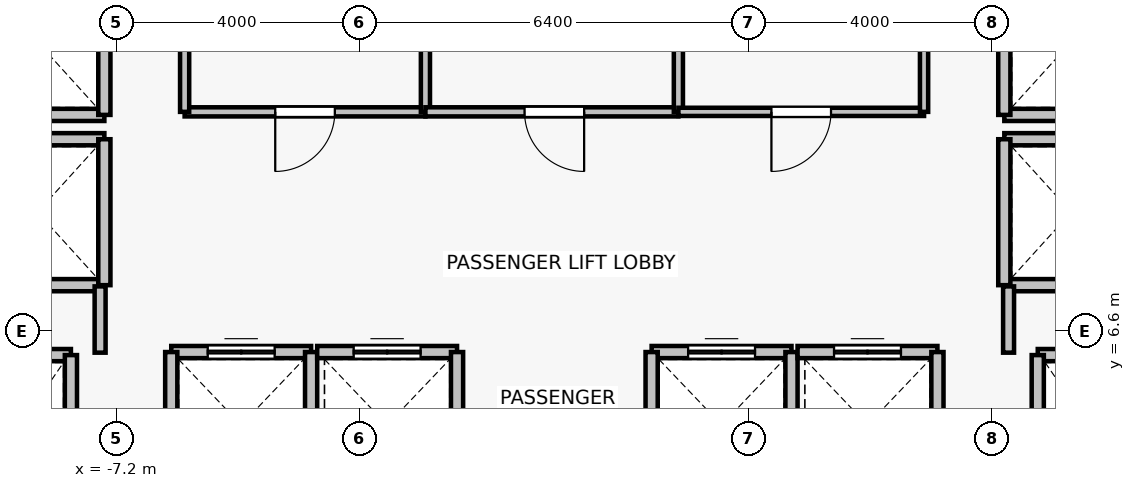
"""IFC4 building model, lengths in metres.
Left out: names, types, materials, properties, quantities, classifications, styles, units other than length and angle.
Written with IfcOpenShell. Run it as: python <this file> out.ifc"""

import sys

from ifc_helpers import new_model, si_unit, direction, frame, frame_2d, origin, place, context, subcontext, project, spatial, rectangle, extrude, source, transform, mapped, element, fill, save


model = new_model("IFC4")
c1 = context("Model", 3, precision=1e-05, world=origin(), true_north=direction((0.0, 1.0)))
c2 = subcontext(c1, "Body", "Model", "MODEL_VIEW")
j1 = project(units=[si_unit("LENGTHUNIT", "METRE"), si_unit("PLANEANGLEUNIT", "RADIAN")], contexts=[c1])
p1 = place(None, origin())
s1 = spatial("IfcSite", under=j1, at=p1, CompositionType="ELEMENT")
p2 = place(p1, origin())
s2 = spatial("IfcBuilding", under=s1, at=p2, CompositionType="ELEMENT")
p3 = place(p2, frame((0.0, 0.0, 179.2)))
s3 = spatial("IfcBuildingStorey", under=s2, at=p3, CompositionType="ELEMENT", Elevation=179.2)
p4 = place(p3, frame((-9.95, 6.2, 0.0), z_axis=(0.0, 0.0, 1.0), x_axis=(1.0, 0.0, 0.0)))
e1 = element("IfcWall", 1, at=p4, inside=s3, PredefinedType="SOLIDWALL", context=c2, shape_type="SweptSolid", body=[
    extrude(rectangle(XDim=2.0, YDim=0.2, at=frame_2d((1.0, 0.0))), origin(), (0.0, 0.0, 1.0), 3.075),
])
p5 = place(p3, frame((-7.95, 6.2, 0.0), z_axis=(0.0, 0.0, 1.0), x_axis=(0.0, -1.0, 0.0)))
e2 = element("IfcWall", 2, at=p5, inside=s3, PredefinedType="SOLIDWALL", context=c2, shape_type="SweptSolid", body=[
    extrude(rectangle(XDim=2.8, YDim=0.2, at=frame_2d((1.4, 0.0))), origin(), (0.0, 0.0, 1.0), 3.075),
])
p6 = place(p3, frame((7.95, 6.2, 0.0), z_axis=(0.0, 0.0, 1.0), x_axis=(1.0, 0.0, 0.0)))
e3 = element("IfcWall", 3, at=p6, inside=s3, PredefinedType="SOLIDWALL", context=c2, shape_type="SweptSolid", body=[
    extrude(rectangle(XDim=2.0, YDim=0.2, at=frame_2d((1.0, 0.0))), origin(), (0.0, 0.0, 1.0), 3.075),
])
p7 = place(p3, frame((7.95, 3.4, 0.0), z_axis=(0.0, 0.0, 1.0), x_axis=(0.0, 1.0, 0.0)))
e4 = element("IfcWall", 4, at=p7, inside=s3, PredefinedType="SOLIDWALL", context=c2, shape_type="SweptSolid", body=[
    extrude(rectangle(XDim=2.8, YDim=0.2, at=frame_2d((1.4, 0.0))), origin(), (0.0, 0.0, 1.0), 3.075),
])
p8 = place(p3, frame((-6.3, 6.25, 0.0), z_axis=(0.0, 0.0, 1.0), x_axis=(1.0, 0.0, 0.0)))
e5 = element("IfcWall", 5, at=p8, inside=s3, PredefinedType="SOLIDWALL", context=c2, shape_type="SweptSolid", body=[
    extrude(rectangle(XDim=2.3, YDim=0.2, at=frame_2d((1.15, 0.0))), origin(), (0.0, 0.0, 1.0), 3.075),
])
p9 = place(p8, frame((0.6, 0.0, 0.0)))
e6 = element("IfcOpeningElement", 6, at=p9, cuts=e5, PredefinedType="OPENING", context=c2, shape_type="SweptSolid", body=[
    extrude(rectangle(XDim=1.1, YDim=2.2, at=frame_2d((0.55, 1.1))), frame((0.0, 0.11, 0.0), z_axis=(0.0, -1.0, 0.0), x_axis=(1.0, 0.0, 0.0)), (0.0, 0.0, 1.0), 0.22),
])
for number, where, z_axis, x_axis in (
    (7, (-6.3, 3.85, 0.0), (0.0, 0.0, 1.0), (0.0, 1.0, 0.0)),
    (8, (-4.0, 6.25, 0.0), (0.0, 0.0, 1.0), (0.0, -1.0, 0.0)),
):
    element("IfcWall", number, at=place(p3, frame(where, z_axis=z_axis, x_axis=x_axis)), inside=s3, PredefinedType="SOLIDWALL", context=c2, shape_type="SweptSolid", body=[
        extrude(rectangle(XDim=2.4, YDim=0.2, at=frame_2d((1.2, 0.0))), origin(), (0.0, 0.0, 1.0), 3.075),
    ])
p10 = place(p3, frame((-3.9, 6.25, 0.0), z_axis=(0.0, 0.0, 1.0), x_axis=(1.0, 0.0, 0.0)))
e9 = element("IfcWall", 9, at=p10, inside=s3, PredefinedType="SOLIDWALL", context=c2, shape_type="SweptSolid", body=[
    extrude(rectangle(XDim=2.3, YDim=0.2, at=frame_2d((1.15, 0.0))), origin(), (0.0, 0.0, 1.0), 3.075),
])
p11 = place(p10, frame((0.6, 0.0, 0.0)))
e10 = element("IfcOpeningElement", 10, at=p11, cuts=e9, PredefinedType="OPENING", context=c2, shape_type="SweptSolid", body=[
    extrude(rectangle(XDim=1.1, YDim=2.2, at=frame_2d((0.55, 1.1))), frame((0.0, 0.11, 0.0), z_axis=(0.0, -1.0, 0.0), x_axis=(1.0, 0.0, 0.0)), (0.0, 0.0, 1.0), 0.22),
])
p12 = place(p3, frame((-1.6, 6.25, 0.0), z_axis=(0.0, 0.0, 1.0), x_axis=(0.0, -1.0, 0.0)))
e11 = element("IfcWall", 11, at=p12, inside=s3, PredefinedType="SOLIDWALL", context=c2, shape_type="SweptSolid", body=[
    extrude(rectangle(XDim=2.4, YDim=0.2, at=frame_2d((1.2, 0.0))), origin(), (0.0, 0.0, 1.0), 3.075),
])
p13 = place(p3, frame((1.6, 6.25, 0.0), z_axis=(0.0, 0.0, 1.0), x_axis=(1.0, 0.0, 0.0)))
e12 = element("IfcWall", 12, at=p13, inside=s3, PredefinedType="SOLIDWALL", context=c2, shape_type="SweptSolid", body=[
    extrude(rectangle(XDim=2.3, YDim=0.2, at=frame_2d((1.15, 0.0))), origin(), (0.0, 0.0, 1.0), 3.075),
])
p14 = place(p13, frame((0.6, 0.0, 0.0)))
e13 = element("IfcOpeningElement", 13, at=p14, cuts=e12, PredefinedType="OPENING", context=c2, shape_type="SweptSolid", body=[
    extrude(rectangle(XDim=1.1, YDim=2.2, at=frame_2d((0.55, 1.1))), frame((0.0, 0.11, 0.0), z_axis=(0.0, -1.0, 0.0), x_axis=(1.0, 0.0, 0.0)), (0.0, 0.0, 1.0), 0.22),
])
for number, where, z_axis, x_axis in (
    (14, (1.6, 3.85, 0.0), (0.0, 0.0, 1.0), (0.0, 1.0, 0.0)),
    (15, (3.9, 6.25, 0.0), (0.0, 0.0, 1.0), (0.0, -1.0, 0.0)),
):
    element("IfcWall", number, at=place(p3, frame(where, z_axis=z_axis, x_axis=x_axis)), inside=s3, PredefinedType="SOLIDWALL", context=c2, shape_type="SweptSolid", body=[
        extrude(rectangle(XDim=2.4, YDim=0.2, at=frame_2d((1.2, 0.0))), origin(), (0.0, 0.0, 1.0), 3.075),
    ])
p15 = place(p3, frame((4.0, 6.25, 0.0), z_axis=(0.0, 0.0, 1.0), x_axis=(1.0, 0.0, 0.0)))
e16 = element("IfcWall", 16, at=p15, inside=s3, PredefinedType="SOLIDWALL", context=c2, shape_type="SweptSolid", body=[
    extrude(rectangle(XDim=2.3, YDim=0.2, at=frame_2d((1.15, 0.0))), origin(), (0.0, 0.0, 1.0), 3.075),
])
p16 = place(p15, frame((0.6, 0.0, 0.0)))
e17 = element("IfcOpeningElement", 17, at=p16, cuts=e16, PredefinedType="OPENING", context=c2, shape_type="SweptSolid", body=[
    extrude(rectangle(XDim=1.1, YDim=2.2, at=frame_2d((0.55, 1.1))), frame((0.0, 0.11, 0.0), z_axis=(0.0, -1.0, 0.0), x_axis=(1.0, 0.0, 0.0)), (0.0, 0.0, 1.0), 0.22),
])
p17 = place(p3, frame((6.3, 6.25, 0.0), z_axis=(0.0, 0.0, 1.0), x_axis=(0.0, -1.0, 0.0)))
e18 = element("IfcWall", 18, at=p17, inside=s3, PredefinedType="SOLIDWALL", context=c2, shape_type="SweptSolid", body=[
    extrude(rectangle(XDim=2.4, YDim=0.2, at=frame_2d((1.2, 0.0))), origin(), (0.0, 0.0, 1.0), 3.075),
])
for number, where, z_axis, x_axis in (
    (19, (-7.4, 7.35, 0.0), (0.0, 0.0, 1.0), (-1.0, 0.0, 0.0)),
    (20, (-9.6, 9.75, 0.0), (0.0, 0.0, 1.0), (1.0, 0.0, 0.0)),
):
    element("IfcWall", number, at=place(p3, frame(where, z_axis=z_axis, x_axis=x_axis)), inside=s3, PredefinedType="SOLIDWALL", context=c2, shape_type="SweptSolid", body=[
        extrude(rectangle(XDim=2.2, YDim=0.2, at=frame_2d((1.1, 0.0))), origin(), (0.0, 0.0, 1.0), 2.565),
    ])
p18 = place(p3, frame((-7.4, 9.75, 0.0), z_axis=(0.0, 0.0, 1.0), x_axis=(0.0, -1.0, 0.0)))
e21 = element("IfcWall", 21, at=p18, inside=s3, PredefinedType="SOLIDWALL", context=c2, shape_type="SweptSolid", body=[
    extrude(rectangle(XDim=2.4, YDim=0.2, at=frame_2d((1.2, 0.0))), origin(), (0.0, 0.0, 1.0), 2.565),
])
p19 = place(p3, frame((-7.4, 10.15, 0.0), z_axis=(0.0, 0.0, 1.0), x_axis=(-1.0, 0.0, 0.0)))
e22 = element("IfcWall", 22, at=p19, inside=s3, PredefinedType="SOLIDWALL", context=c2, shape_type="SweptSolid", body=[
    extrude(rectangle(XDim=2.2, YDim=0.2, at=frame_2d((1.1, 0.0))), origin(), (0.0, 0.0, 1.0), 2.565),
])
p20 = place(p3, frame((-7.4, 12.55, 0.0), z_axis=(0.0, 0.0, 1.0), x_axis=(0.0, -1.0, 0.0)))
e23 = element("IfcWall", 23, at=p20, inside=s3, PredefinedType="SOLIDWALL", context=c2, shape_type="SweptSolid", body=[
    extrude(rectangle(XDim=2.4, YDim=0.2, at=frame_2d((1.2, 0.0))), origin(), (0.0, 0.0, 1.0), 2.565),
])
for number, where, z_axis, x_axis in (
    (24, (9.6, 7.35, 0.0), (0.0, 0.0, 1.0), (-1.0, 0.0, 0.0)),
    (25, (7.4, 9.75, 0.0), (0.0, 0.0, 1.0), (1.0, 0.0, 0.0)),
):
    element("IfcWall", number, at=place(p3, frame(where, z_axis=z_axis, x_axis=x_axis)), inside=s3, PredefinedType="SOLIDWALL", context=c2, shape_type="SweptSolid", body=[
        extrude(rectangle(XDim=2.2, YDim=0.2, at=frame_2d((1.1, 0.0))), origin(), (0.0, 0.0, 1.0), 2.565),
    ])
p21 = place(p3, frame((7.4, 7.35, 0.0), z_axis=(0.0, 0.0, 1.0), x_axis=(0.0, 1.0, 0.0)))
e26 = element("IfcWall", 26, at=p21, inside=s3, PredefinedType="SOLIDWALL", context=c2, shape_type="SweptSolid", body=[
    extrude(rectangle(XDim=2.4, YDim=0.2, at=frame_2d((1.2, 0.0))), origin(), (0.0, 0.0, 1.0), 2.565),
])
p22 = place(p3, frame((9.6, 10.15, 0.0), z_axis=(0.0, 0.0, 1.0), x_axis=(-1.0, 0.0, 0.0)))
e27 = element("IfcWall", 27, at=p22, inside=s3, PredefinedType="SOLIDWALL", context=c2, shape_type="SweptSolid", body=[
    extrude(rectangle(XDim=2.2, YDim=0.2, at=frame_2d((1.1, 0.0))), origin(), (0.0, 0.0, 1.0), 2.565),
])
p23 = place(p3, frame((7.4, 10.15, 0.0), z_axis=(0.0, 0.0, 1.0), x_axis=(0.0, 1.0, 0.0)))
e28 = element("IfcWall", 28, at=p23, inside=s3, PredefinedType="SOLIDWALL", context=c2, shape_type="SweptSolid", body=[
    extrude(rectangle(XDim=2.4, YDim=0.2, at=frame_2d((1.2, 0.0))), origin(), (0.0, 0.0, 1.0), 2.565),
])
for number, where, z_axis, x_axis in (
    (29, (-7.47, 7.33, 0.0), (0.0, 0.0, 1.0), (0.0, -1.0, 0.0)),
    (30, (7.47, 6.24, 0.0), (0.0, 0.0, 1.0), (0.0, 1.0, 0.0)),
):
    element("IfcWall", number, at=place(p3, frame(where, z_axis=z_axis, x_axis=x_axis)), inside=s3, PredefinedType="PARTITIONING", context=c2, shape_type="SweptSolid", body=[
        extrude(rectangle(XDim=1.09, YDim=0.18, at=frame_2d((0.545, 0.0))), origin(), (0.0, 0.0, 1.0), 2.565),
    ])
p24 = place(p3, frame((-2.12, 10.2, 0.0), z_axis=(0.0, 0.0, 1.0), x_axis=(-1.0, 0.0, 0.0)))
e31 = element("IfcWall", 31, at=p24, inside=s3, PredefinedType="PARTITIONING", context=c2, shape_type="SweptSolid", body=[
    extrude(rectangle(XDim=3.96, YDim=0.15, at=frame_2d((1.98, 0.0))), origin(), (0.0, 0.0, 1.0), 3.075),
])
p25 = place(p24, frame((1.49, 0.0, 0.0)))
e32 = element("IfcOpeningElement", 32, at=p25, cuts=e31, PredefinedType="OPENING", context=c2, shape_type="SweptSolid", body=[
    extrude(rectangle(XDim=0.98, YDim=2.15, at=frame_2d((0.49, 1.075))), frame((0.0, 0.085, 0.0), z_axis=(0.0, -1.0, 0.0), x_axis=(1.0, 0.0, 0.0)), (0.0, 0.0, 1.0), 0.17),
])
for number, where, z_axis, x_axis in (
    (33, (-6.08, 10.2, 0.0), (0.0, 0.0, 1.0), (0.0, 1.0, 0.0)),
    (34, (-2.12, 13.0, 0.0), (0.0, 0.0, 1.0), (0.0, -1.0, 0.0)),
):
    element("IfcWall", number, at=place(p3, frame(where, z_axis=z_axis, x_axis=x_axis)), inside=s3, PredefinedType="PARTITIONING", context=c2, shape_type="SweptSolid", body=[
        extrude(rectangle(XDim=2.8, YDim=0.15, at=frame_2d((1.4, 0.0))), origin(), (0.0, 0.0, 1.0), 3.075),
    ])
p26 = place(p3, frame((2.04, 10.2, 0.0), z_axis=(0.0, 0.0, 1.0), x_axis=(-1.0, 0.0, 0.0)))
e35 = element("IfcWall", 35, at=p26, inside=s3, PredefinedType="PARTITIONING", context=c2, shape_type="SweptSolid", body=[
    extrude(rectangle(XDim=4.16, YDim=0.15, at=frame_2d((2.08, 0.0))), origin(), (0.0, 0.0, 1.0), 3.075),
])
p27 = place(p26, frame((1.55, 0.0, 0.0)))
e36 = element("IfcOpeningElement", 36, at=p27, cuts=e35, PredefinedType="OPENING", context=c2, shape_type="SweptSolid", body=[
    extrude(rectangle(XDim=0.98, YDim=2.15, at=frame_2d((0.49, 1.075))), frame((0.0, 0.085, 0.0), z_axis=(0.0, -1.0, 0.0), x_axis=(1.0, 0.0, 0.0)), (0.0, 0.0, 1.0), 0.17),
])
p28 = place(p3, frame((2.04, 13.0, 0.0), z_axis=(0.0, 0.0, 1.0), x_axis=(0.0, -1.0, 0.0)))
e37 = element("IfcWall", 37, at=p28, inside=s3, PredefinedType="PARTITIONING", context=c2, shape_type="SweptSolid", body=[
    extrude(rectangle(XDim=2.8, YDim=0.15, at=frame_2d((1.4, 0.0))), origin(), (0.0, 0.0, 1.0), 3.075),
])
p29 = place(p3, frame((6.08, 10.2, 0.0), z_axis=(0.0, 0.0, 1.0), x_axis=(-1.0, 0.0, 0.0)))
e38 = element("IfcWall", 38, at=p29, inside=s3, PredefinedType="PARTITIONING", context=c2, shape_type="SweptSolid", body=[
    extrude(rectangle(XDim=4.04, YDim=0.135, at=frame_2d((2.02, 0.0))), origin(), (0.0, 0.0, 1.0), 3.075),
])
p30 = place(p29, frame((1.53, 0.0, 0.0)))
e39 = element("IfcOpeningElement", 39, at=p30, cuts=e38, PredefinedType="OPENING", context=c2, shape_type="SweptSolid", body=[
    extrude(rectangle(XDim=0.98, YDim=2.15, at=frame_2d((0.49, 1.075))), frame((0.0, 0.077, 0.0), z_axis=(0.0, -1.0, 0.0), x_axis=(1.0, 0.0, 0.0)), (0.0, 0.0, 1.0), 0.155),
])
p31 = place(p3, frame((6.08, 13.0, 0.0), z_axis=(0.0, 0.0, 1.0), x_axis=(0.0, -1.0, 0.0)))
e40 = element("IfcWall", 40, at=p31, inside=s3, PredefinedType="PARTITIONING", context=c2, shape_type="SweptSolid", body=[
    extrude(rectangle(XDim=2.8, YDim=0.135, at=frame_2d((1.4, 0.0))), origin(), (0.0, 0.0, 1.0), 3.075),
])
m1 = source(origin(), c2, "Body", "SweptSolid", [
    extrude(rectangle(XDim=1.1, YDim=2.2, at=frame_2d((0.55, 1.1))), frame((0.0, 0.025, 0.0), z_axis=(0.0, -1.0, 0.0), x_axis=(1.0, 0.0, 0.0)), (0.0, 0.0, 1.0), 0.05),
])
p32 = place(p9, origin())
e41 = element("IfcDoor", 41, at=p32, inside=s3, OperationType="DOUBLE_DOOR_SLIDING", PredefinedType="DOOR", context=c2, shape_type="MappedRepresentation", body=[
    mapped(m1, transform((0.0, 0.0, 0.0), x_axis=(1.0, 0.0, 0.0), y_axis=(0.0, 1.0, 0.0), z_axis=(0.0, 0.0, 1.0), scale=1.0)),
])
fill(e6, e41)
p33 = place(p11, origin())
e42 = element("IfcDoor", 42, at=p33, inside=s3, OperationType="DOUBLE_DOOR_SLIDING", PredefinedType="DOOR", context=c2, shape_type="MappedRepresentation", body=[
    mapped(m1, transform((0.0, 0.0, 0.0), x_axis=(1.0, 0.0, 0.0), y_axis=(0.0, 1.0, 0.0), z_axis=(0.0, 0.0, 1.0), scale=1.0)),
])
fill(e10, e42)
p34 = place(p14, origin())
e43 = element("IfcDoor", 43, at=p34, inside=s3, OperationType="DOUBLE_DOOR_SLIDING", PredefinedType="DOOR", context=c2, shape_type="MappedRepresentation", body=[
    mapped(m1, transform((0.0, 0.0, 0.0), x_axis=(1.0, 0.0, 0.0), y_axis=(0.0, 1.0, 0.0), z_axis=(0.0, 0.0, 1.0), scale=1.0)),
])
fill(e13, e43)
p35 = place(p16, origin())
e44 = element("IfcDoor", 44, at=p35, inside=s3, OperationType="DOUBLE_DOOR_SLIDING", PredefinedType="DOOR", context=c2, shape_type="MappedRepresentation", body=[
    mapped(m1, transform((0.0, 0.0, 0.0), x_axis=(1.0, 0.0, 0.0), y_axis=(0.0, 1.0, 0.0), z_axis=(0.0, 0.0, 1.0), scale=1.0)),
])
fill(e17, e44)
m2 = source(origin(), c2, "Body", "SweptSolid", [
    extrude(rectangle(XDim=0.98, YDim=2.15, at=frame_2d((0.49, 1.075))), frame((0.0, 0.025, 0.0), z_axis=(0.0, -1.0, 0.0), x_axis=(1.0, 0.0, 0.0)), (0.0, 0.0, 1.0), 0.05),
])
p36 = place(p25, origin())
e45 = element("IfcDoor", 45, at=p36, inside=s3, OperationType="SINGLE_SWING_RIGHT", PredefinedType="DOOR", context=c2, shape_type="MappedRepresentation", body=[
    mapped(m2, transform((0.0, 0.0, 0.0), x_axis=(1.0, 0.0, 0.0), y_axis=(0.0, 1.0, 0.0), z_axis=(0.0, 0.0, 1.0), scale=1.0)),
])
fill(e32, e45)
p37 = place(p27, origin())
e46 = element("IfcDoor", 46, at=p37, inside=s3, OperationType="SINGLE_SWING_LEFT", PredefinedType="DOOR", context=c2, shape_type="MappedRepresentation", body=[
    mapped(m2, transform((0.0, 0.0, 0.0), x_axis=(1.0, 0.0, 0.0), y_axis=(0.0, 1.0, 0.0), z_axis=(0.0, 0.0, 1.0), scale=1.0)),
])
fill(e36, e46)
p38 = place(p30, origin())
e47 = element("IfcDoor", 47, at=p38, inside=s3, OperationType="SINGLE_SWING_RIGHT", PredefinedType="DOOR", context=c2, shape_type="MappedRepresentation", body=[
    mapped(m2, transform((0.0, 0.0, 0.0), x_axis=(1.0, 0.0, 0.0), y_axis=(0.0, 1.0, 0.0), z_axis=(0.0, 0.0, 1.0), scale=1.0)),
])
fill(e39, e47)
save(model, sys.argv[1])
